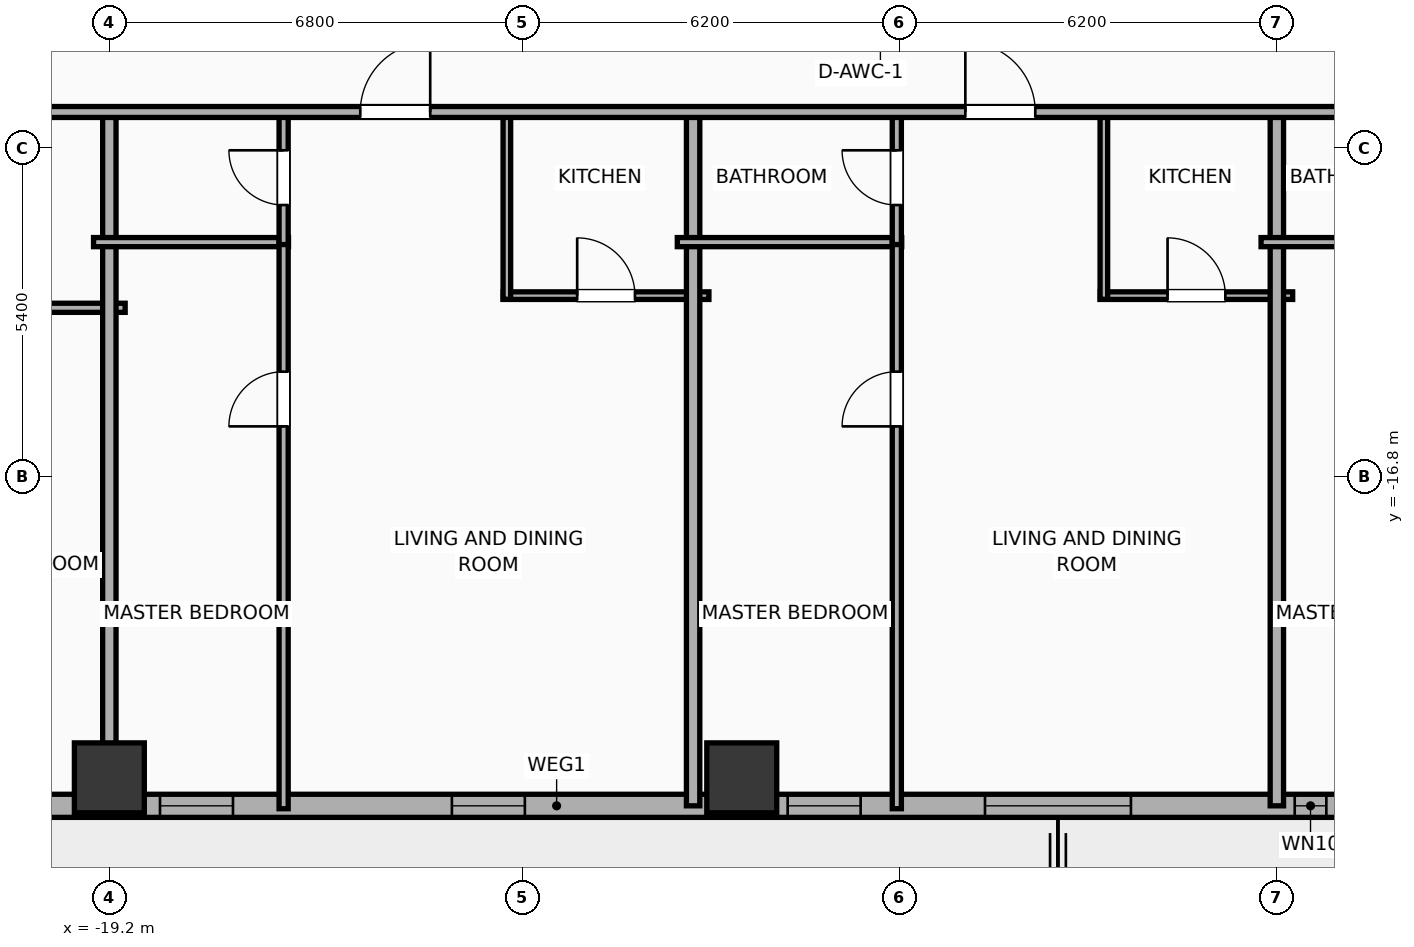
"""IFC4 building model, lengths in metres.
Left out: names, types, materials, properties, quantities, classifications, styles, units other than length and angle.
Written with IfcOpenShell. Run it as: python <this file> out.ifc"""

import sys

from ifc_helpers import new_model, si_unit, direction, frame, frame_2d, origin, origin_2d, place, context, subcontext, project, spatial, rectangle, hollow_rectangle, extrude, element, fill, save


model = new_model("IFC4")
c1 = context("Model", 3, precision=1e-05, world=origin(), true_north=direction((0.0, 1.0)))
c2 = subcontext(c1, "Body", "Model", "MODEL_VIEW")
j1 = project(units=[si_unit("LENGTHUNIT", "METRE"), si_unit("PLANEANGLEUNIT", "RADIAN")], contexts=[c1])
p1 = place(None, origin())
s1 = spatial("IfcSite", under=j1, at=p1, CompositionType="ELEMENT")
p2 = place(p1, origin())
s2 = spatial("IfcBuilding", under=s1, at=p2, CompositionType="ELEMENT")
p3 = place(p2, frame((0.0, 0.0, 53.3)))
s3 = spatial("IfcBuildingStorey", under=s2, at=p3, CompositionType="ELEMENT", Elevation=53.3)
for number, where, z_axis, x_axis in (
    (1, (-19.2, -21.75, 0.0), (0.0, 0.0, 1.0), (1.0, 0.0, 0.0)),
    (2, (-8.8, -21.75, 0.0), (0.0, 0.0, 1.0), (1.0, 0.0, 0.0)),
):
    element("IfcColumn", number, at=place(p3, frame(where, z_axis=z_axis, x_axis=x_axis)), inside=s3, PredefinedType="COLUMN", context=c2, shape_type="SweptSolid", body=[
        extrude(hollow_rectangle(XDim=1.15, YDim=1.15, WallThickness=0.04, at=origin_2d()), origin(), (0.0, 0.0, 1.0), 3.9),
    ])
p4 = place(p3, frame((22.381, -22.21, 0.0), z_axis=(0.0, 0.0, 1.0), x_axis=(-1.0, 0.0, 0.0)))
e3 = element("IfcWall", 3, at=p4, inside=s3, PredefinedType="ELEMENTEDWALL", context=c2, shape_type="SweptSolid", body=[
    extrude(rectangle(XDim=51.963, YDim=0.38, at=frame_2d((25.981, 0.0))), origin(), (0.0, 0.0, 1.0), 3.65),
])
p5 = place(p4, frame((14.839, 0.0, 0.0)))
e4 = element("IfcOpeningElement", 4, at=p5, cuts=e3, PredefinedType="OPENING", context=c2, shape_type="SweptSolid", body=[
    extrude(rectangle(XDim=1.5, YDim=2.05, at=frame_2d((0.75, 1.025))), frame((0.0, 0.2, 0.0), z_axis=(0.0, -1.0, 0.0), x_axis=(1.0, 0.0, 0.0)), (0.0, 0.0, 1.0), 0.4),
])
p6 = place(p4, frame((6.61, 0.0, 0.75)))
e5 = element("IfcOpeningElement", 5, at=p6, cuts=e3, PredefinedType="OPENING", context=c2, shape_type="SweptSolid", body=[
    extrude(rectangle(XDim=2.4, YDim=2.1, at=frame_2d((1.2, 1.05))), frame((0.0, 0.2, 0.0), z_axis=(0.0, -1.0, 0.0), x_axis=(1.0, 0.0, 0.0)), (0.0, 0.0, 1.0), 0.4),
])
p7 = place(p4, frame((24.781, 0.0, 0.75)))
e6 = element("IfcOpeningElement", 6, at=p7, cuts=e3, PredefinedType="OPENING", context=c2, shape_type="SweptSolid", body=[
    extrude(rectangle(XDim=2.4, YDim=2.1, at=frame_2d((1.2, 1.05))), frame((0.0, 0.2, 0.0), z_axis=(0.0, -1.0, 0.0), x_axis=(1.0, 0.0, 0.0)), (0.0, 0.0, 1.0), 0.4),
])
p8 = place(p4, frame((49.281, 0.0, 0.75)))
e7 = element("IfcOpeningElement", 7, at=p8, cuts=e3, PredefinedType="OPENING", context=c2, shape_type="SweptSolid", body=[
    extrude(rectangle(XDim=1.2, YDim=2.05, at=frame_2d((0.6, 1.025))), frame((0.0, 0.2, 0.0), z_axis=(0.0, -1.0, 0.0), x_axis=(1.0, 0.0, 0.0)), (0.0, 0.0, 1.0), 0.4),
])
p9 = place(p4, frame((46.241, 0.0, 0.75)))
e8 = element("IfcOpeningElement", 8, at=p9, cuts=e3, PredefinedType="OPENING", context=c2, shape_type="SweptSolid", body=[
    extrude(rectangle(XDim=1.2, YDim=2.05, at=frame_2d((0.6, 1.025))), frame((0.0, 0.2, 0.0), z_axis=(0.0, -1.0, 0.0), x_axis=(1.0, 0.0, 0.0)), (0.0, 0.0, 1.0), 0.4),
])
p10 = place(p4, frame((42.686, 0.0, 0.75)))
e9 = element("IfcOpeningElement", 9, at=p10, cuts=e3, PredefinedType="OPENING", context=c2, shape_type="SweptSolid", body=[
    extrude(rectangle(XDim=1.2, YDim=2.05, at=frame_2d((0.6, 1.025))), frame((0.0, 0.2, 0.0), z_axis=(0.0, -1.0, 0.0), x_axis=(1.0, 0.0, 0.0)), (0.0, 0.0, 1.0), 0.4),
])
p11 = place(p4, frame((39.548, 0.0, 0.75)))
e10 = element("IfcOpeningElement", 10, at=p11, cuts=e3, PredefinedType="OPENING", context=c2, shape_type="SweptSolid", body=[
    extrude(rectangle(XDim=1.2, YDim=2.05, at=frame_2d((0.6, 1.025))), frame((0.0, 0.2, 0.0), z_axis=(0.0, -1.0, 0.0), x_axis=(1.0, 0.0, 0.0)), (0.0, 0.0, 1.0), 0.4),
])
p12 = place(p4, frame((34.748, 0.0, 0.75)))
e11 = element("IfcOpeningElement", 11, at=p12, cuts=e3, PredefinedType="OPENING", context=c2, shape_type="SweptSolid", body=[
    extrude(rectangle(XDim=1.2, YDim=2.05, at=frame_2d((0.6, 1.025))), frame((0.0, 0.2, 0.0), z_axis=(0.0, -1.0, 0.0), x_axis=(1.0, 0.0, 0.0)), (0.0, 0.0, 1.0), 0.4),
])
p13 = place(p4, frame((29.226, 0.0, 0.75)))
e12 = element("IfcOpeningElement", 12, at=p13, cuts=e3, PredefinedType="OPENING", context=c2, shape_type="SweptSolid", body=[
    extrude(rectangle(XDim=1.2, YDim=2.05, at=frame_2d((0.6, 1.025))), frame((0.0, 0.2, 0.0), z_axis=(0.0, -1.0, 0.0), x_axis=(1.0, 0.0, 0.0)), (0.0, 0.0, 1.0), 0.4),
])
p14 = place(p4, frame((21.568, 0.0, 0.75)))
e13 = element("IfcOpeningElement", 13, at=p14, cuts=e3, PredefinedType="OPENING", context=c2, shape_type="SweptSolid", body=[
    extrude(rectangle(XDim=0.52, YDim=2.05, at=frame_2d((0.26, 1.025))), frame((0.0, 0.2, 0.0), z_axis=(0.0, -1.0, 0.0), x_axis=(1.0, 0.0, 0.0)), (0.0, 0.0, 1.0), 0.4),
])
p15 = place(p4, frame((11.146, 0.0, 0.75)))
e14 = element("IfcOpeningElement", 14, at=p15, cuts=e3, PredefinedType="OPENING", context=c2, shape_type="SweptSolid", body=[
    extrude(rectangle(XDim=1.2, YDim=2.05, at=frame_2d((0.6, 1.025))), frame((0.0, 0.2, 0.0), z_axis=(0.0, -1.0, 0.0), x_axis=(1.0, 0.0, 0.0)), (0.0, 0.0, 1.0), 0.4),
])
p16 = place(p4, frame((1.436, 0.0, 0.75)))
e15 = element("IfcOpeningElement", 15, at=p16, cuts=e3, PredefinedType="OPENING", context=c2, shape_type="SweptSolid", body=[
    extrude(rectangle(XDim=1.2, YDim=2.05, at=frame_2d((0.6, 1.025))), frame((0.0, 0.2, 0.0), z_axis=(0.0, -1.0, 0.0), x_axis=(1.0, 0.0, 0.0)), (0.0, 0.0, 1.0), 0.4),
])
p17 = place(p3, frame((-22.73, -14.02, 0.0), z_axis=(0.0, 0.0, 1.0), x_axis=(1.0, 0.0, 0.0)))
e16 = element("IfcWall", 16, at=p17, inside=s3, PredefinedType="PLUMBINGWALL", context=c2, shape_type="SweptSolid", body=[
    extrude(rectangle(XDim=3.79, YDim=0.15, at=frame_2d((1.895, 0.0))), origin(), (0.0, 0.0, 1.0), 3.65),
])
p18 = place(p3, frame((-19.2, -22.21, 0.0), z_axis=(0.0, 0.0, 1.0), x_axis=(0.0, 1.0, 0.0)))
e17 = element("IfcWall", 17, at=p18, inside=s3, PredefinedType="PARTITIONING", context=c2, shape_type="SweptSolid", body=[
    extrude(rectangle(XDim=11.49, YDim=0.22, at=frame_2d((5.745, 0.0))), origin(), (0.0, 0.0, 1.0), 2.94),
])
p19 = place(p3, frame((-19.46, -12.94, 0.0), z_axis=(0.0, 0.0, 1.0), x_axis=(1.0, 0.0, 0.0)))
e18 = element("IfcWall", 18, at=p19, inside=s3, PredefinedType="PLUMBINGWALL", context=c2, shape_type="SweptSolid", body=[
    extrude(rectangle(XDim=3.206, YDim=0.15, at=frame_2d((1.603, 0.0))), origin(), (0.0, 0.0, 1.0), 3.65),
])
p20 = place(p3, frame((-16.334, -22.258, 0.0), z_axis=(0.0, 0.0, 1.0), x_axis=(0.0, 1.0, 0.0)))
e19 = element("IfcWall", 19, at=p20, inside=s3, PredefinedType="PLUMBINGWALL", context=c2, shape_type="SweptSolid", body=[
    extrude(rectangle(XDim=9.358, YDim=0.15, at=frame_2d((4.679, 0.0))), origin(), (0.0, 0.0, 1.0), 3.65),
])
p21 = place(p20, frame((6.288, 0.0, 0.0)))
e20 = element("IfcOpeningElement", 20, at=p21, cuts=e19, PredefinedType="OPENING", context=c2, shape_type="SweptSolid", body=[
    extrude(rectangle(XDim=0.9, YDim=2.05, at=frame_2d((0.45, 1.025))), frame((0.0, 0.085, 0.0), z_axis=(0.0, -1.0, 0.0), x_axis=(1.0, 0.0, 0.0)), (0.0, 0.0, 1.0), 0.17),
])
p22 = place(p3, frame((-16.334, -12.98, 0.0), z_axis=(0.0, 0.0, 1.0), x_axis=(0.0, 1.0, 0.0)))
e21 = element("IfcWall", 21, at=p22, inside=s3, PredefinedType="PLUMBINGWALL", context=c2, shape_type="SweptSolid", body=[
    extrude(rectangle(XDim=2.2, YDim=0.15, at=frame_2d((1.1, 0.0))), origin(), (0.0, 0.0, 1.0), 3.65),
])
p23 = place(p22, frame((0.65, 0.0, 0.0)))
e22 = element("IfcOpeningElement", 22, at=p23, cuts=e21, PredefinedType="OPENING", context=c2, shape_type="SweptSolid", body=[
    extrude(rectangle(XDim=0.9, YDim=2.05, at=frame_2d((0.45, 1.025))), frame((0.0, 0.085, 0.0), z_axis=(0.0, -1.0, 0.0), x_axis=(1.0, 0.0, 0.0)), (0.0, 0.0, 1.0), 0.17),
])
p24 = place(p3, frame((-12.723, -13.82, 0.0), z_axis=(0.0, 0.0, 1.0), x_axis=(1.0, 0.0, 0.0)))
e23 = element("IfcWall", 23, at=p24, inside=s3, PredefinedType="PARTITIONING", context=c2, shape_type="SweptSolid", body=[
    extrude(rectangle(XDim=3.383, YDim=0.125, at=frame_2d((1.691, 0.0))), origin(), (0.0, 0.0, 1.0), 3.65),
])
p25 = place(p24, frame((1.217, 0.0, 0.0)))
e24 = element("IfcOpeningElement", 24, at=p25, cuts=e23, PredefinedType="OPENING", context=c2, shape_type="SweptSolid", body=[
    extrude(rectangle(XDim=0.95, YDim=2.05, at=frame_2d((0.475, 1.025))), frame((0.0, 0.073, 0.0), z_axis=(0.0, -1.0, 0.0), x_axis=(1.0, 0.0, 0.0)), (0.0, 0.0, 1.0), 0.145),
])
p26 = place(p3, frame((-12.663, -13.88, 0.0), z_axis=(0.0, 0.0, 1.0), x_axis=(0.0, 1.0, 0.0)))
e25 = element("IfcWall", 25, at=p26, inside=s3, PredefinedType="PARTITIONING", context=c2, shape_type="SweptSolid", body=[
    extrude(rectangle(XDim=3.1, YDim=0.125, at=frame_2d((1.55, 0.0))), origin(), (0.0, 0.0, 1.0), 3.65),
])
p27 = place(p3, frame((-9.6, -22.21, 0.0), z_axis=(0.0, 0.0, 1.0), x_axis=(0.0, 1.0, 0.0)))
e26 = element("IfcWall", 26, at=p27, inside=s3, PredefinedType="PARTITIONING", context=c2, shape_type="SweptSolid", body=[
    extrude(rectangle(XDim=11.49, YDim=0.22, at=frame_2d((5.745, 0.0))), origin(), (0.0, 0.0, 1.0), 2.94),
])
p28 = place(p3, frame((-9.86, -12.94, 0.0), z_axis=(0.0, 0.0, 1.0), x_axis=(1.0, 0.0, 0.0)))
e27 = element("IfcWall", 27, at=p28, inside=s3, PredefinedType="PLUMBINGWALL", context=c2, shape_type="SweptSolid", body=[
    extrude(rectangle(XDim=3.69, YDim=0.15, at=frame_2d((1.845, 0.0))), origin(), (0.0, 0.0, 1.0), 3.65),
])
p29 = place(p3, frame((-6.25, -22.258, 0.0), z_axis=(0.0, 0.0, 1.0), x_axis=(0.0, 1.0, 0.0)))
e28 = element("IfcWall", 28, at=p29, inside=s3, PredefinedType="PLUMBINGWALL", context=c2, shape_type="SweptSolid", body=[
    extrude(rectangle(XDim=9.358, YDim=0.15, at=frame_2d((4.679, 0.0))), origin(), (0.0, 0.0, 1.0), 3.65),
])
p30 = place(p29, frame((6.288, 0.0, 0.0)))
e29 = element("IfcOpeningElement", 29, at=p30, cuts=e28, PredefinedType="OPENING", context=c2, shape_type="SweptSolid", body=[
    extrude(rectangle(XDim=0.9, YDim=2.05, at=frame_2d((0.45, 1.025))), frame((0.0, 0.085, 0.0), z_axis=(0.0, -1.0, 0.0), x_axis=(1.0, 0.0, 0.0)), (0.0, 0.0, 1.0), 0.17),
])
p31 = place(p3, frame((-6.25, -12.98, 0.0), z_axis=(0.0, 0.0, 1.0), x_axis=(0.0, 1.0, 0.0)))
e30 = element("IfcWall", 30, at=p31, inside=s3, PredefinedType="PLUMBINGWALL", context=c2, shape_type="SweptSolid", body=[
    extrude(rectangle(XDim=2.2, YDim=0.15, at=frame_2d((1.1, 0.0))), origin(), (0.0, 0.0, 1.0), 3.65),
])
p32 = place(p31, frame((0.65, 0.0, 0.0)))
e31 = element("IfcOpeningElement", 31, at=p32, cuts=e30, PredefinedType="OPENING", context=c2, shape_type="SweptSolid", body=[
    extrude(rectangle(XDim=0.9, YDim=2.05, at=frame_2d((0.45, 1.025))), frame((0.0, 0.085, 0.0), z_axis=(0.0, -1.0, 0.0), x_axis=(1.0, 0.0, 0.0)), (0.0, 0.0, 1.0), 0.17),
])
p33 = place(p3, frame((-2.905, -13.82, 0.0), z_axis=(0.0, 0.0, 1.0), x_axis=(1.0, 0.0, 0.0)))
e32 = element("IfcWall", 32, at=p33, inside=s3, PredefinedType="PARTITIONING", context=c2, shape_type="SweptSolid", body=[
    extrude(rectangle(XDim=3.165, YDim=0.125, at=frame_2d((1.583, 0.0))), origin(), (0.0, 0.0, 1.0), 3.65),
])
p34 = place(p33, frame((1.107, 0.0, 0.0)))
e33 = element("IfcOpeningElement", 33, at=p34, cuts=e32, PredefinedType="OPENING", context=c2, shape_type="SweptSolid", body=[
    extrude(rectangle(XDim=0.95, YDim=2.05, at=frame_2d((0.475, 1.025))), frame((0.0, 0.073, 0.0), z_axis=(0.0, -1.0, 0.0), x_axis=(1.0, 0.0, 0.0)), (0.0, 0.0, 1.0), 0.145),
])
p35 = place(p3, frame((-2.845, -13.88, 0.0), z_axis=(0.0, 0.0, 1.0), x_axis=(0.0, 1.0, 0.0)))
e34 = element("IfcWall", 34, at=p35, inside=s3, PredefinedType="PARTITIONING", context=c2, shape_type="SweptSolid", body=[
    extrude(rectangle(XDim=3.1, YDim=0.125, at=frame_2d((1.55, 0.0))), origin(), (0.0, 0.0, 1.0), 3.65),
])
p36 = place(p3, frame((0.0, -22.21, 0.0), z_axis=(0.0, 0.0, 1.0), x_axis=(0.0, 1.0, 0.0)))
e35 = element("IfcWall", 35, at=p36, inside=s3, PredefinedType="PARTITIONING", context=c2, shape_type="SweptSolid", body=[
    extrude(rectangle(XDim=11.49, YDim=0.22, at=frame_2d((5.745, 0.0))), origin(), (0.0, 0.0, 1.0), 3.65),
])
p37 = place(p3, frame((-0.26, -12.94, 0.0), z_axis=(0.0, 0.0, 1.0), x_axis=(1.0, 0.0, 0.0)))
e36 = element("IfcWall", 36, at=p37, inside=s3, PredefinedType="PLUMBINGWALL", context=c2, shape_type="SweptSolid", body=[
    extrude(rectangle(XDim=3.367, YDim=0.15, at=frame_2d((1.684, 0.0))), origin(), (0.0, 0.0, 1.0), 3.65),
])
p38 = place(p3, frame((-33.41, -10.8, 0.0), z_axis=(0.0, 0.0, 1.0), x_axis=(1.0, 0.0, 0.0)))
e37 = element("IfcWall", 37, at=p38, inside=s3, PredefinedType="PARTITIONING", context=c2, shape_type="SweptSolid", body=[
    extrude(rectangle(XDim=59.62, YDim=0.18, at=frame_2d((29.81, 0.0))), origin(), (0.0, 0.0, 1.0), 3.65),
])
p39 = place(p38, frame((3.104, 0.0, 0.0)))
e38 = element("IfcOpeningElement", 38, at=p39, cuts=e37, PredefinedType="OPENING", context=c2, shape_type="SweptSolid", body=[
    extrude(rectangle(XDim=1.15, YDim=2.05, at=frame_2d((0.575, 1.025))), frame((0.0, 0.1, 0.0), z_axis=(0.0, -1.0, 0.0), x_axis=(1.0, 0.0, 0.0)), (0.0, 0.0, 1.0), 0.2),
])
p40 = place(p38, frame((10.246, 0.0, 0.0)))
e39 = element("IfcOpeningElement", 39, at=p40, cuts=e37, PredefinedType="OPENING", context=c2, shape_type="SweptSolid", body=[
    extrude(rectangle(XDim=1.15, YDim=2.05, at=frame_2d((0.575, 1.025))), frame((0.0, 0.1, 0.0), z_axis=(0.0, -1.0, 0.0), x_axis=(1.0, 0.0, 0.0)), (0.0, 0.0, 1.0), 0.2),
])
p41 = place(p38, frame((18.336, 0.0, 0.0)))
e40 = element("IfcOpeningElement", 40, at=p41, cuts=e37, PredefinedType="OPENING", context=c2, shape_type="SweptSolid", body=[
    extrude(rectangle(XDim=1.15, YDim=2.05, at=frame_2d((0.575, 1.025))), frame((0.0, 0.1, 0.0), z_axis=(0.0, -1.0, 0.0), x_axis=(1.0, 0.0, 0.0)), (0.0, 0.0, 1.0), 0.2),
])
p42 = place(p38, frame((28.287, 0.0, 0.0)))
e41 = element("IfcOpeningElement", 41, at=p42, cuts=e37, PredefinedType="OPENING", context=c2, shape_type="SweptSolid", body=[
    extrude(rectangle(XDim=1.15, YDim=2.05, at=frame_2d((0.575, 1.025))), frame((0.0, 0.1, 0.0), z_axis=(0.0, -1.0, 0.0), x_axis=(1.0, 0.0, 0.0)), (0.0, 0.0, 1.0), 0.2),
])
p43 = place(p38, frame((37.653, 0.0, 0.0)))
e42 = element("IfcOpeningElement", 42, at=p43, cuts=e37, PredefinedType="OPENING", context=c2, shape_type="SweptSolid", body=[
    extrude(rectangle(XDim=1.15, YDim=2.05, at=frame_2d((0.575, 1.025))), frame((0.0, 0.1, 0.0), z_axis=(0.0, -1.0, 0.0), x_axis=(1.0, 0.0, 0.0)), (0.0, 0.0, 1.0), 0.2),
])
p44 = place(p38, frame((47.604, 0.0, 0.0)))
e43 = element("IfcOpeningElement", 43, at=p44, cuts=e37, PredefinedType="OPENING", context=c2, shape_type="SweptSolid", body=[
    extrude(rectangle(XDim=1.15, YDim=2.05, at=frame_2d((0.575, 1.025))), frame((0.0, 0.1, 0.0), z_axis=(0.0, -1.0, 0.0), x_axis=(1.0, 0.0, 0.0)), (0.0, 0.0, 1.0), 0.2),
])
p45 = place(p38, frame((55.736, 0.0, 0.0)))
e44 = element("IfcOpeningElement", 44, at=p45, cuts=e37, PredefinedType="OPENING", context=c2, shape_type="SweptSolid", body=[
    extrude(rectangle(XDim=1.15, YDim=2.05, at=frame_2d((0.575, 1.025))), frame((0.0, 0.1, 0.0), z_axis=(0.0, -1.0, 0.0), x_axis=(1.0, 0.0, 0.0)), (0.0, 0.0, 1.0), 0.2),
])
p46 = place(p7, origin())
e45 = element("IfcWindow", 45, at=p46, inside=s3, PartitioningType="SINGLE_PANEL", PredefinedType="WINDOW", context=c2, shape_type="SweptSolid", body=[
    extrude(rectangle(XDim=2.4, YDim=2.1, at=frame_2d((1.2, 1.05))), frame((0.0, 0.03, 0.0), z_axis=(0.0, -1.0, 0.0), x_axis=(1.0, 0.0, 0.0)), (0.0, 0.0, 1.0), 0.06),
])
fill(e6, e45)
p47 = place(p11, origin())
e46 = element("IfcWindow", 46, at=p47, inside=s3, PartitioningType="SINGLE_PANEL", PredefinedType="WINDOW", context=c2, shape_type="SweptSolid", body=[
    extrude(rectangle(XDim=1.2, YDim=2.05, at=frame_2d((0.6, 1.025))), frame((0.0, 0.03, 0.0), z_axis=(0.0, -1.0, 0.0), x_axis=(1.0, 0.0, 0.0)), (0.0, 0.0, 1.0), 0.06),
])
fill(e10, e46)
p48 = place(p12, origin())
e47 = element("IfcWindow", 47, at=p48, inside=s3, PartitioningType="SINGLE_PANEL", PredefinedType="WINDOW", context=c2, shape_type="SweptSolid", body=[
    extrude(rectangle(XDim=1.2, YDim=2.05, at=frame_2d((0.6, 1.025))), frame((0.0, 0.03, 0.0), z_axis=(0.0, -1.0, 0.0), x_axis=(1.0, 0.0, 0.0)), (0.0, 0.0, 1.0), 0.06),
])
fill(e11, e47)
p49 = place(p13, origin())
e48 = element("IfcWindow", 48, at=p49, inside=s3, PartitioningType="SINGLE_PANEL", PredefinedType="WINDOW", context=c2, shape_type="SweptSolid", body=[
    extrude(rectangle(XDim=1.2, YDim=2.05, at=frame_2d((0.6, 1.025))), frame((0.0, 0.03, 0.0), z_axis=(0.0, -1.0, 0.0), x_axis=(1.0, 0.0, 0.0)), (0.0, 0.0, 1.0), 0.06),
])
fill(e12, e48)
p50 = place(p14, origin())
e49 = element("IfcWindow", 49, at=p50, inside=s3, PartitioningType="SINGLE_PANEL", PredefinedType="WINDOW", context=c2, shape_type="SweptSolid", body=[
    extrude(rectangle(XDim=0.52, YDim=2.05, at=frame_2d((0.26, 1.025))), frame((0.0, 0.03, 0.0), z_axis=(0.0, -1.0, 0.0), x_axis=(1.0, 0.0, 0.0)), (0.0, 0.0, 1.0), 0.06),
])
fill(e13, e49)
p51 = place(p21, origin())
e50 = element("IfcDoor", 50, at=p51, inside=s3, OperationType="SINGLE_SWING_LEFT", PredefinedType="DOOR", context=c2, shape_type="SweptSolid", body=[
    extrude(rectangle(XDim=0.9, YDim=2.05, at=frame_2d((0.45, 1.025))), frame((0.0, 0.025, 0.0), z_axis=(0.0, -1.0, 0.0), x_axis=(1.0, 0.0, 0.0)), (0.0, 0.0, 1.0), 0.05),
])
fill(e20, e50)
p52 = place(p23, origin())
e51 = element("IfcDoor", 51, at=p52, inside=s3, OperationType="SINGLE_SWING_RIGHT", PredefinedType="DOOR", context=c2, shape_type="SweptSolid", body=[
    extrude(rectangle(XDim=0.9, YDim=2.05, at=frame_2d((0.45, 1.025))), frame((0.0, 0.025, 0.0), z_axis=(0.0, -1.0, 0.0), x_axis=(1.0, 0.0, 0.0)), (0.0, 0.0, 1.0), 0.05),
])
fill(e22, e51)
p53 = place(p25, origin())
e52 = element("IfcDoor", 52, at=p53, inside=s3, OperationType="SINGLE_SWING_LEFT", PredefinedType="DOOR", context=c2, shape_type="SweptSolid", body=[
    extrude(rectangle(XDim=0.95, YDim=2.05, at=frame_2d((0.475, 1.025))), frame((0.0, 0.025, 0.0), z_axis=(0.0, -1.0, 0.0), x_axis=(1.0, 0.0, 0.0)), (0.0, 0.0, 1.0), 0.05),
])
fill(e24, e52)
p54 = place(p30, origin())
e53 = element("IfcDoor", 53, at=p54, inside=s3, OperationType="SINGLE_SWING_LEFT", PredefinedType="DOOR", context=c2, shape_type="SweptSolid", body=[
    extrude(rectangle(XDim=0.9, YDim=2.05, at=frame_2d((0.45, 1.025))), frame((0.0, 0.025, 0.0), z_axis=(0.0, -1.0, 0.0), x_axis=(1.0, 0.0, 0.0)), (0.0, 0.0, 1.0), 0.05),
])
fill(e29, e53)
p55 = place(p32, origin())
e54 = element("IfcDoor", 54, at=p55, inside=s3, OperationType="SINGLE_SWING_RIGHT", PredefinedType="DOOR", context=c2, shape_type="SweptSolid", body=[
    extrude(rectangle(XDim=0.9, YDim=2.05, at=frame_2d((0.45, 1.025))), frame((0.0, 0.025, 0.0), z_axis=(0.0, -1.0, 0.0), x_axis=(1.0, 0.0, 0.0)), (0.0, 0.0, 1.0), 0.05),
])
fill(e31, e54)
p56 = place(p34, origin())
e55 = element("IfcDoor", 55, at=p56, inside=s3, OperationType="SINGLE_SWING_LEFT", PredefinedType="DOOR", context=c2, shape_type="SweptSolid", body=[
    extrude(rectangle(XDim=0.95, YDim=2.05, at=frame_2d((0.475, 1.025))), frame((0.0, 0.025, 0.0), z_axis=(0.0, -1.0, 0.0), x_axis=(1.0, 0.0, 0.0)), (0.0, 0.0, 1.0), 0.05),
])
fill(e33, e55)
p57 = place(p41, origin())
e56 = element("IfcDoor", 56, at=p57, inside=s3, OperationType="SINGLE_SWING_RIGHT", PredefinedType="DOOR", context=c2, shape_type="SweptSolid", body=[
    extrude(rectangle(XDim=1.15, YDim=2.05, at=frame_2d((0.575, 1.025))), frame((0.0, 0.025, 0.0), z_axis=(0.0, -1.0, 0.0), x_axis=(1.0, 0.0, 0.0)), (0.0, 0.0, 1.0), 0.05),
])
fill(e40, e56)
p58 = place(p42, origin())
e57 = element("IfcDoor", 57, at=p58, inside=s3, OperationType="SINGLE_SWING_LEFT", PredefinedType="DOOR", context=c2, shape_type="SweptSolid", body=[
    extrude(rectangle(XDim=1.15, YDim=2.05, at=frame_2d((0.575, 1.025))), frame((0.0, 0.025, 0.0), z_axis=(0.0, -1.0, 0.0), x_axis=(1.0, 0.0, 0.0)), (0.0, 0.0, 1.0), 0.05),
])
fill(e41, e57)
save(model, sys.argv[1])
